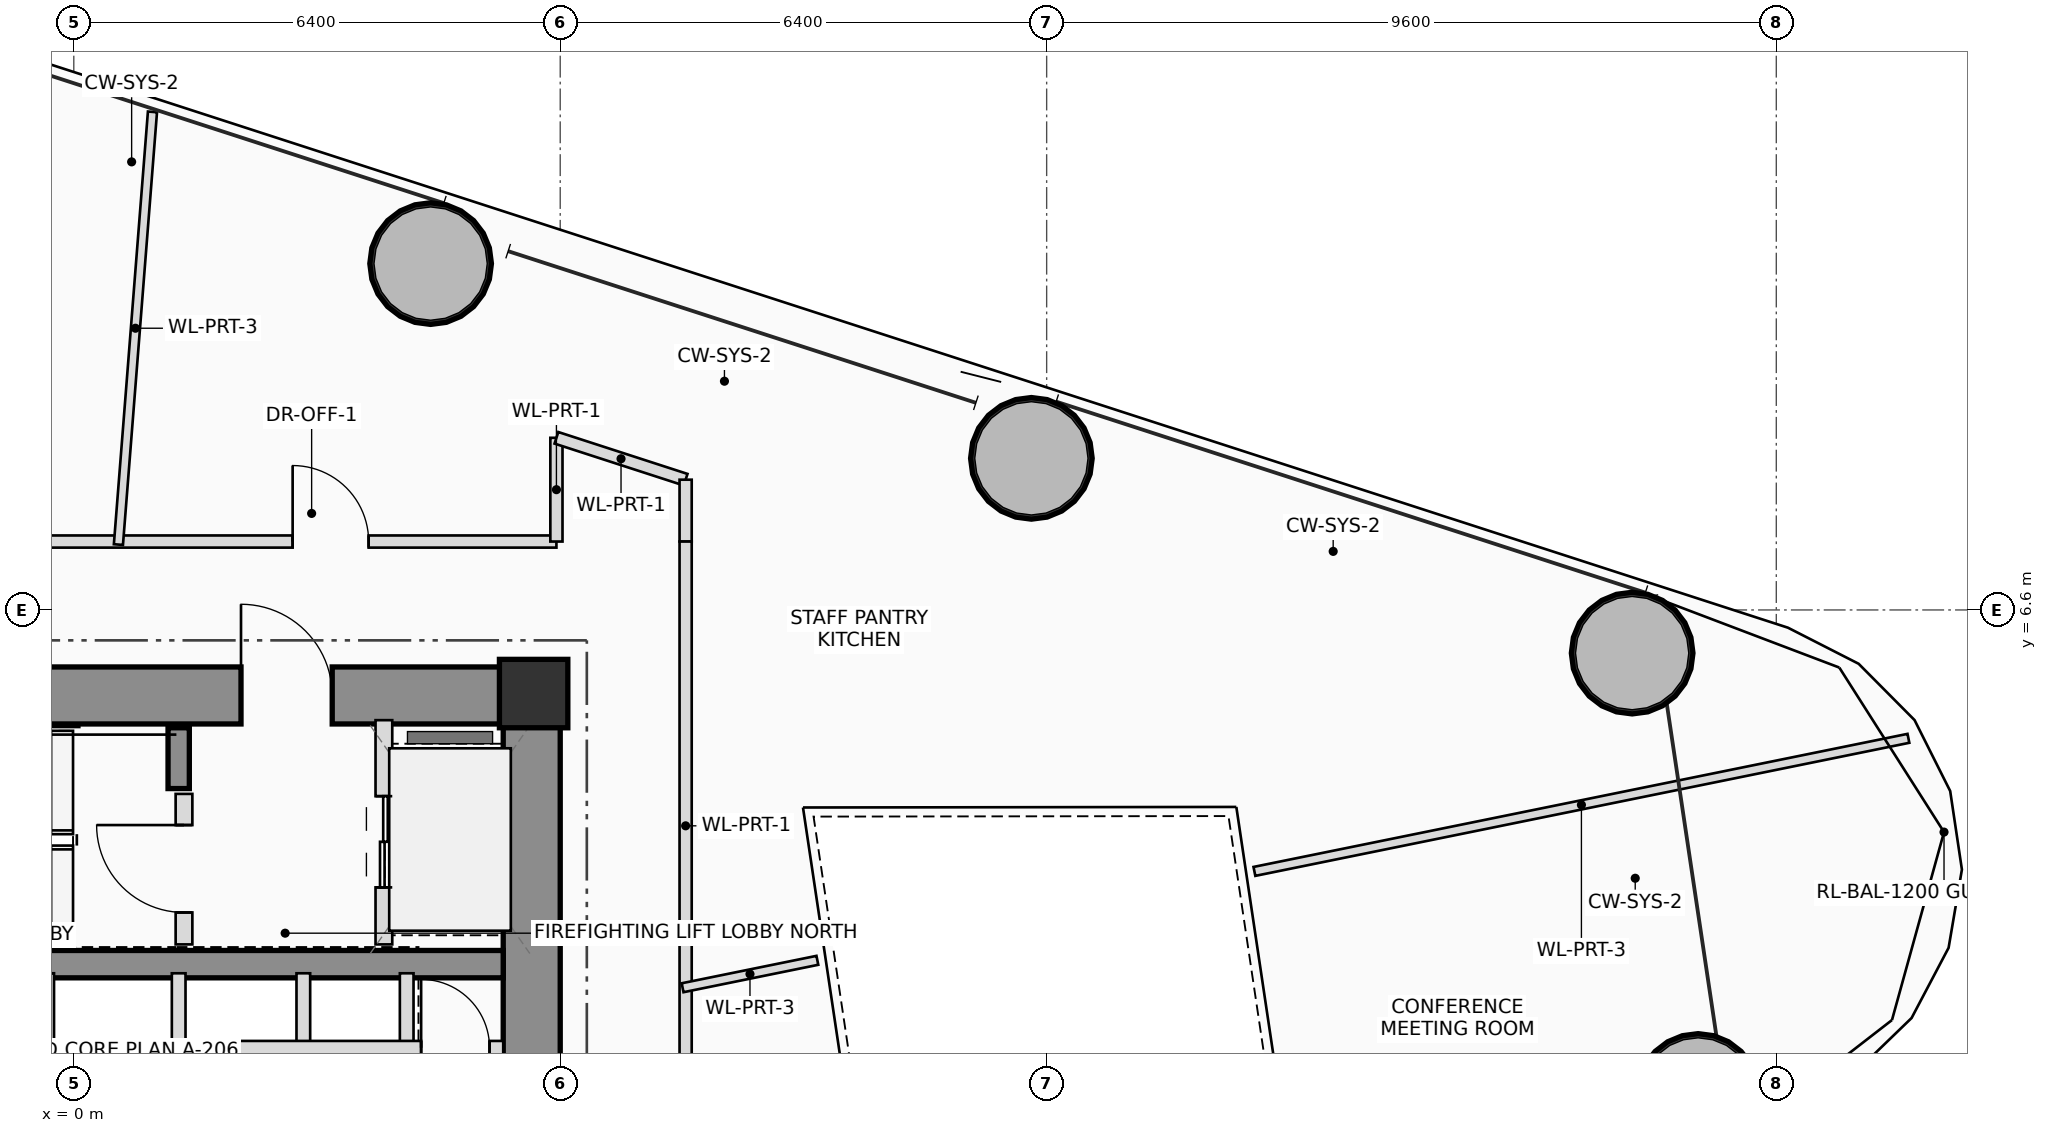
"""IFC4 building model, lengths in metres.
Left out: names, types, materials, properties, quantities, classifications, styles, units other than length and angle.
Written with IfcOpenShell. Run it as: python <this file> out.ifc"""

import sys

from ifc_helpers import new_model, si_unit, direction, frame, frame_2d, origin, origin_2d, place, context, subcontext, project, spatial, rectangle, hollow_circle, extrude, source, transform, mapped, element, fill, save


model = new_model("IFC4")
c1 = context("Model", 3, precision=1e-05, world=origin(), true_north=direction((0.0, 1.0)))
c2 = subcontext(c1, "Body", "Model", "MODEL_VIEW")
j1 = project(units=[si_unit("LENGTHUNIT", "METRE"), si_unit("PLANEANGLEUNIT", "RADIAN")], contexts=[c1])
p1 = place(None, origin())
s1 = spatial("IfcSite", under=j1, at=p1, CompositionType="ELEMENT")
p2 = place(p1, origin())
s2 = spatial("IfcBuilding", under=s1, at=p2, CompositionType="ELEMENT")
p3 = place(p2, frame((0.0, 0.0, 62.3)))
s3 = spatial("IfcBuildingStorey", under=s2, at=p3, CompositionType="ELEMENT", Elevation=62.3)
m1 = source(origin(), c2, "Body", "SweptSolid", [
    extrude(rectangle(XDim=0.9, YDim=0.9, at=origin_2d()), origin(), (0.0, 0.0, 1.0), 3.75),
])
p4 = place(p3, frame((6.05, 5.5, 0.0), z_axis=(0.0, 0.0, 1.0), x_axis=(1.0, 0.0, 0.0)))
e1 = element("IfcColumn", 1, at=p4, inside=s3, PredefinedType="COLUMN", context=c2, shape_type="MappedRepresentation", body=[
    mapped(m1, transform((0.0, 0.0, 0.0), scale=1.0)),
])
p5 = place(p3, frame((-6.4, 5.475, 0.0), z_axis=(0.0, 0.0, 1.0), x_axis=(1.0, 0.0, 0.0)))
e2 = element("IfcWall", 2, at=p5, inside=s3, PredefinedType="SHEAR", context=c2, shape_type="SweptSolid", body=[
    extrude(rectangle(XDim=12.8, YDim=0.75, at=frame_2d((6.4, 0.0))), origin(), (0.0, 0.0, 1.0), 3.75),
])
p6 = place(p5, frame((8.6, 0.0, 0.0)))
e3 = element("IfcOpeningElement", 3, at=p6, cuts=e2, PredefinedType="OPENING", context=c2, shape_type="SweptSolid", body=[
    extrude(rectangle(XDim=1.2, YDim=2.2, at=frame_2d((0.6, 1.1))), frame((0.0, 0.385, 0.0), z_axis=(0.0, -1.0, 0.0), x_axis=(1.0, 0.0, 0.0)), (0.0, 0.0, 1.0), 0.77),
])
p7 = place(p3, frame((6.025, -5.1, 0.0), z_axis=(0.0, 0.0, 1.0), x_axis=(0.0, 1.0, 0.0)))
e4 = element("IfcWall", 4, at=p7, inside=s3, PredefinedType="SHEAR", context=c2, shape_type="SweptSolid", body=[
    extrude(rectangle(XDim=10.2, YDim=0.75, at=frame_2d((5.1, 0.0))), origin(), (0.0, 0.0, 1.0), 3.75),
])
p8 = place(p3, frame((-5.65, 1.94, 0.0), z_axis=(0.0, 0.0, 1.0), x_axis=(1.0, 0.0, 0.0)))
e5 = element("IfcWall", 5, at=p8, inside=s3, PredefinedType="SHEAR", context=c2, shape_type="SweptSolid", body=[
    extrude(rectangle(XDim=11.3, YDim=0.36, at=frame_2d((5.65, 0.0))), origin(), (0.0, 0.0, 1.0), 3.75),
])
p9 = place(p3, frame((1.38, 4.25, 0.0), z_axis=(0.0, 0.0, 1.0), x_axis=(0.0, 1.0, 0.0)))
e6 = element("IfcWall", 6, at=p9, inside=s3, PredefinedType="SHEAR", context=c2, shape_type="SweptSolid", body=[
    extrude(rectangle(XDim=0.8, YDim=0.28, at=frame_2d((0.4, 0.0))), origin(), (0.0, 0.0, 1.0), 3.75),
])
m2 = source(origin(), c2, "Body", "SweptSolid", [
    extrude(hollow_circle(Radius=0.8, WallThickness=0.055, at=origin_2d()), origin(), (0.0, 0.0, 1.0), 3.75),
])
for number, where, z_axis, x_axis in (
    (7, (21.371, 0.226, 0.0), (0.0, 0.0, 1.0), (1.0, 0.0, 0.0)),
    (8, (20.503, 6.032, 0.0), (0.0, 0.0, 1.0), (1.0, 0.0, 0.0)),
    (9, (12.599, 8.594, 0.0), (0.0, 0.0, 1.0), (1.0, 0.0, 0.0)),
    (10, (4.695, 11.157, 0.0), (0.0, 0.0, 1.0), (1.0, 0.0, 0.0)),
):
    element("IfcColumn", number, at=place(p3, frame(where, z_axis=z_axis, x_axis=x_axis)), inside=s3, PredefinedType="COLUMN", context=c2, shape_type="MappedRepresentation", body=[
        mapped(m2, transform((0.0, 0.0, 0.0), scale=1.0)),
    ])
p10 = place(p3, frame((1.45, 2.2, 0.0), z_axis=(0.0, 0.0, 1.0), x_axis=(0.0, 1.0, 0.0)))
e11 = element("IfcWall", 11, at=p10, inside=s3, PredefinedType="PLUMBINGWALL", context=c2, shape_type="SweptSolid", body=[
    extrude(rectangle(XDim=1.98, YDim=0.22, at=frame_2d((0.99, 0.0))), origin(), (0.0, 0.0, 1.0), 3.545),
])
p11 = place(p10, frame((0.42, 0.0, 0.0)))
e12 = element("IfcOpeningElement", 12, at=p11, cuts=e11, PredefinedType="OPENING", context=c2, shape_type="SweptSolid", body=[
    extrude(rectangle(XDim=1.15, YDim=2.15, at=frame_2d((0.575, 1.075))), frame((0.0, 0.12, 0.0), z_axis=(0.0, -1.0, 0.0), x_axis=(1.0, 0.0, 0.0)), (0.0, 0.0, 1.0), 0.24),
])
p12 = place(p3, frame((4.08, 2.2, 0.0), z_axis=(0.0, 0.0, 1.0), x_axis=(0.0, 1.0, 0.0)))
e13 = element("IfcWall", 13, at=p12, inside=s3, PredefinedType="PLUMBINGWALL", context=c2, shape_type="SweptSolid", body=[
    extrude(rectangle(XDim=2.95, YDim=0.22, at=frame_2d((1.475, 0.0))), origin(), (0.0, 0.0, 1.0), 3.545),
])
p13 = place(p12, frame((0.75, 0.0, 0.0)))
e14 = element("IfcOpeningElement", 14, at=p13, cuts=e13, PredefinedType="OPENING", context=c2, shape_type="SweptSolid", body=[
    extrude(rectangle(XDim=1.2, YDim=2.25, at=frame_2d((0.6, 1.125))), frame((0.0, 0.12, 0.0), z_axis=(0.0, -1.0, 0.0), x_axis=(1.0, 0.0, 0.0)), (0.0, 0.0, 1.0), 0.24),
])
for number, where, z_axis, x_axis in (
    (15, (-0.35, 0.84, 0.0), (0.0, 0.0, 1.0), (0.0, 1.0, 0.0)),
    (16, (1.38, 0.84, 0.0), (0.0, 0.0, 1.0), (0.0, 1.0, 0.0)),
    (17, (3.02, 0.84, 0.0), (0.0, 0.0, 1.0), (0.0, 1.0, 0.0)),
    (18, (4.38, 0.84, 0.0), (0.0, 0.0, 1.0), (0.0, 1.0, 0.0)),
):
    element("IfcWall", number, at=place(p3, frame(where, z_axis=z_axis, x_axis=x_axis)), inside=s3, PredefinedType="PLUMBINGWALL", context=c2, shape_type="SweptSolid", body=[
        extrude(rectangle(XDim=0.98, YDim=0.18, at=frame_2d((0.49, 0.0))), origin(), (0.0, 0.0, 1.0), 3.545),
    ])
p14 = place(p3, frame((-5.68, 0.84, 0.0), z_axis=(0.0, 0.0, 1.0), x_axis=(1.0, 0.0, 0.0)))
e19 = element("IfcWall", 19, at=p14, inside=s3, PredefinedType="PLUMBINGWALL", context=c2, shape_type="SweptSolid", body=[
    extrude(rectangle(XDim=11.33, YDim=0.18, at=frame_2d((5.665, 0.0))), origin(), (0.0, 0.0, 1.0), 3.545),
])
p15 = place(p14, frame((0.43, 0.0, 0.0)))
e20 = element("IfcOpeningElement", 20, at=p15, cuts=e19, PredefinedType="OPENING", context=c2, shape_type="SweptSolid", body=[
    extrude(rectangle(XDim=1.1, YDim=2.2, at=frame_2d((0.55, 1.1))), frame((0.0, 0.1, 0.0), z_axis=(0.0, -1.0, 0.0), x_axis=(1.0, 0.0, 0.0)), (0.0, 0.0, 1.0), 0.2),
])
p16 = place(p14, frame((2.13, 0.0, 0.0)))
e21 = element("IfcOpeningElement", 21, at=p16, cuts=e19, PredefinedType="OPENING", context=c2, shape_type="SweptSolid", body=[
    extrude(rectangle(XDim=1.1, YDim=2.2, at=frame_2d((0.55, 1.1))), frame((0.0, 0.1, 0.0), z_axis=(0.0, -1.0, 0.0), x_axis=(1.0, 0.0, 0.0)), (0.0, 0.0, 1.0), 0.2),
])
p17 = place(p14, frame((10.25, 0.0, 0.0)))
e22 = element("IfcOpeningElement", 22, at=p17, cuts=e19, PredefinedType="OPENING", context=c2, shape_type="SweptSolid", body=[
    extrude(rectangle(XDim=0.9, YDim=2.05, at=frame_2d((0.45, 1.025))), frame((0.0, 0.1, 0.0), z_axis=(0.0, -1.0, 0.0), x_axis=(1.0, 0.0, 0.0)), (0.0, 0.0, 1.0), 0.2),
])
p18 = place(p3, frame((-6.35, 7.5, 0.0), z_axis=(0.0, 0.0, 1.0), x_axis=(1.0, 0.0, 0.0)))
e23 = element("IfcWall", 23, at=p18, inside=s3, PredefinedType="PARTITIONING", context=c2, shape_type="SweptSolid", body=[
    extrude(rectangle(XDim=12.7, YDim=0.16, at=frame_2d((6.35, 0.0))), origin(), (0.0, 0.0, 1.0), 2.85),
])
p19 = place(p18, frame((9.229, 0.0, 0.0)))
e24 = element("IfcOpeningElement", 24, at=p19, cuts=e23, PredefinedType="OPENING", context=c2, shape_type="SweptSolid", body=[
    extrude(rectangle(XDim=1.0, YDim=2.25, at=frame_2d((0.5, 1.125))), frame((0.0, 0.09, 0.0), z_axis=(0.0, -1.0, 0.0), x_axis=(1.0, 0.0, 0.0)), (0.0, 0.0, 1.0), 0.18),
])
p20 = place(p3, frame((6.35, 7.5, 0.0), z_axis=(0.0, 0.0, 1.0), x_axis=(0.0, 1.0, 0.0)))
e25 = element("IfcWall", 25, at=p20, inside=s3, PredefinedType="PARTITIONING", context=c2, shape_type="SweptSolid", body=[
    extrude(rectangle(XDim=1.365, YDim=0.16, at=frame_2d((0.682, 0.0))), origin(), (0.0, 0.0, 1.0), 3.05),
])
p21 = place(p3, frame((6.35, 8.865, 0.0), z_axis=(0.0, 0.0, 1.0), x_axis=(0.951273733128, -0.308347668486, 0.0)))
e26 = element("IfcWall", 26, at=p21, inside=s3, PredefinedType="PARTITIONING", context=c2, shape_type="SweptSolid", body=[
    extrude(rectangle(XDim=1.787, YDim=0.16, at=frame_2d((0.894, 0.0))), origin(), (0.0, 0.0, 1.0), 3.2),
])
p22 = place(p3, frame((8.05, 8.314, 0.0), z_axis=(0.0, 0.0, 1.0), x_axis=(0.0, -1.0, 0.0)))
e27 = element("IfcWall", 27, at=p22, inside=s3, PredefinedType="PARTITIONING", context=c2, shape_type="SweptSolid", body=[
    extrude(rectangle(XDim=0.814, YDim=0.16, at=frame_2d((0.407, 0.0))), origin(), (0.0, 0.0, 1.0), 3.05),
])
p23 = place(p3, frame((8.05, 7.5, 0.0), z_axis=(0.0, 0.0, 1.0), x_axis=(0.0, -1.0, 0.0)))
e28 = element("IfcWall", 28, at=p23, inside=s3, PredefinedType="PARTITIONING", context=c2, shape_type="SweptSolid", body=[
    extrude(rectangle(XDim=7.48, YDim=0.16, at=frame_2d((3.74, 0.0))), origin(), (0.0, 0.0, 1.0), 2.85),
])
p24 = place(p3, frame((0.587, 7.46, 0.0), z_axis=(0.0, 0.0, 1.0), x_axis=(0.078455369282, 0.996917627004, 0.0)))
e29 = element("IfcWall", 29, at=p24, inside=s3, PredefinedType="PARTITIONING", context=c2, shape_type="SweptSolid", body=[
    extrude(rectangle(XDim=5.71, YDim=0.12, at=frame_2d((2.855, 0.0))), origin(), (0.0, 0.0, 1.0), 3.01),
])
p25 = place(p3, frame((8.01, 1.63, 0.0), z_axis=(0.0, 0.0, 1.0), x_axis=(0.979916112173, 0.199410162989, 0.0)))
e30 = element("IfcWall", 30, at=p25, inside=s3, PredefinedType="PARTITIONING", context=c2, shape_type="SweptSolid", body=[
    extrude(rectangle(XDim=1.81, YDim=0.12, at=frame_2d((0.905, 0.0))), origin(), (0.0, 0.0, 1.0), 3.21),
])
p26 = place(p3, frame((15.533, 3.16, 0.0), z_axis=(0.0, 0.0, 1.0), x_axis=(0.979928377953, 0.199349878562, 0.0)))
e31 = element("IfcWall", 31, at=p26, inside=s3, PredefinedType="PARTITIONING", context=c2, shape_type="SweptSolid", body=[
    extrude(rectangle(XDim=8.781, YDim=0.12, at=frame_2d((4.391, 0.0))), origin(), (0.0, 0.0, 1.0), 3.01),
])
p27 = place(p6, origin())
e32 = element("IfcDoor", 32, at=p27, inside=s3, OperationType="SINGLE_SWING_LEFT", PredefinedType="DOOR", context=c2, shape_type="SweptSolid", body=[
    extrude(rectangle(XDim=1.2, YDim=2.2, at=frame_2d((0.6, 1.1))), frame((0.0, 0.025, 0.0), z_axis=(0.0, -1.0, 0.0), x_axis=(1.0, 0.0, 0.0)), (0.0, 0.0, 1.0), 0.05),
])
fill(e3, e32)
p28 = place(p11, origin())
e33 = element("IfcDoor", 33, at=p28, inside=s3, OperationType="SINGLE_SWING_RIGHT", PredefinedType="DOOR", context=c2, shape_type="SweptSolid", body=[
    extrude(rectangle(XDim=1.15, YDim=2.15, at=frame_2d((0.575, 1.075))), frame((0.0, 0.025, 0.0), z_axis=(0.0, -1.0, 0.0), x_axis=(1.0, 0.0, 0.0)), (0.0, 0.0, 1.0), 0.05),
])
fill(e12, e33)
p29 = place(p13, origin())
e34 = element("IfcDoor", 34, at=p29, inside=s3, OperationType="DOUBLE_DOOR_SLIDING", PredefinedType="DOOR", context=c2, shape_type="SweptSolid", body=[
    extrude(rectangle(XDim=1.2, YDim=2.25, at=frame_2d((0.6, 1.125))), frame((0.0, 0.025, 0.0), z_axis=(0.0, -1.0, 0.0), x_axis=(1.0, 0.0, 0.0)), (0.0, 0.0, 1.0), 0.05),
])
fill(e14, e34)
p30 = place(p17, origin())
e35 = element("IfcDoor", 35, at=p30, inside=s3, OperationType="SINGLE_SWING_LEFT", PredefinedType="DOOR", context=c2, shape_type="SweptSolid", body=[
    extrude(rectangle(XDim=0.9, YDim=2.05, at=frame_2d((0.45, 1.025))), frame((0.0, 0.025, 0.0), z_axis=(0.0, -1.0, 0.0), x_axis=(1.0, 0.0, 0.0)), (0.0, 0.0, 1.0), 0.05),
])
fill(e22, e35)
p31 = place(p19, origin())
e36 = element("IfcDoor", 36, at=p31, inside=s3, OperationType="SINGLE_SWING_LEFT", PredefinedType="DOOR", context=c2, shape_type="SweptSolid", body=[
    extrude(rectangle(XDim=1.0, YDim=2.25, at=frame_2d((0.5, 1.125))), frame((0.0, 0.025, 0.0), z_axis=(0.0, -1.0, 0.0), x_axis=(1.0, 0.0, 0.0)), (0.0, 0.0, 1.0), 0.05),
])
fill(e24, e36)
save(model, sys.argv[1])
